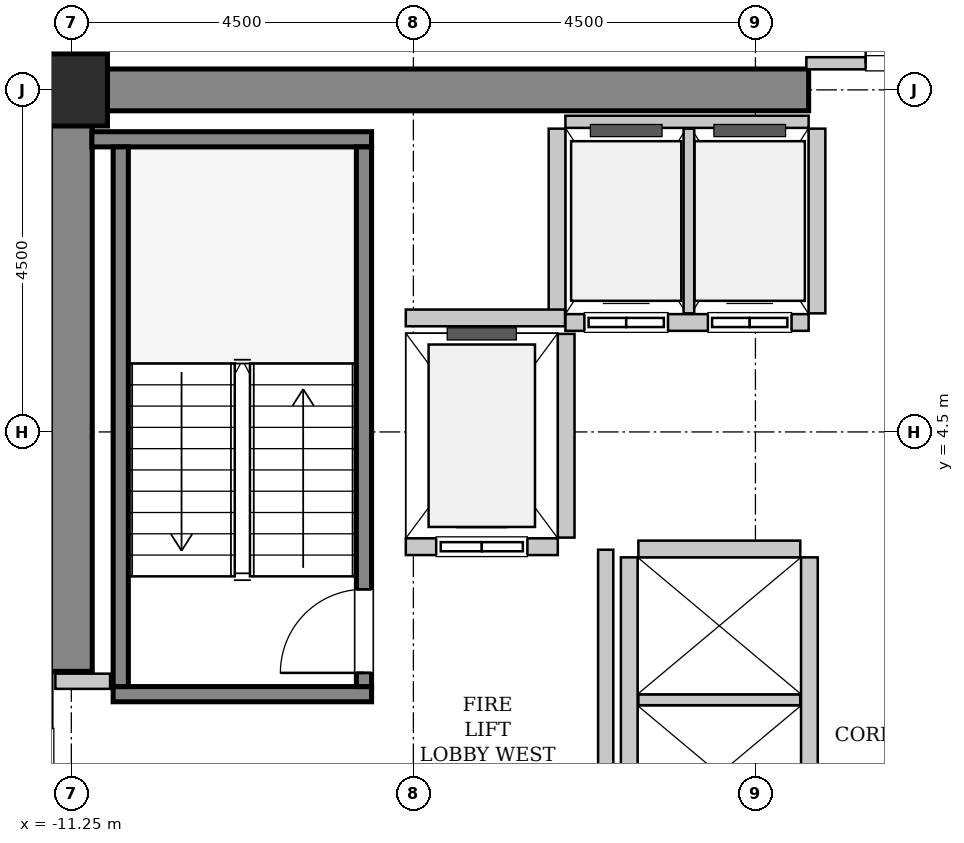
"""IFC4 building model, lengths in metres.
Left out: names, types, materials, properties, quantities, classifications, styles, units other than length and angle.
Written with IfcOpenShell. Run it as: python <this file> out.ifc"""

import sys

from ifc_helpers import new_model, si_unit, direction, frame, frame_2d, origin, origin_2d, place, context, subcontext, project, spatial, rectangle, hollow_rectangle, extrude, source, transform, mapped, element, fill, save


model = new_model("IFC4")
c1 = context("Model", 3, precision=1e-05, world=origin(), true_north=direction((0.0, 1.0)))
c2 = subcontext(c1, "Body", "Model", "MODEL_VIEW")
j1 = project(units=[si_unit("LENGTHUNIT", "METRE"), si_unit("PLANEANGLEUNIT", "RADIAN")], contexts=[c1])
p1 = place(None, origin())
s1 = spatial("IfcSite", under=j1, at=p1, CompositionType="ELEMENT")
p2 = place(p1, origin())
s2 = spatial("IfcBuilding", under=s1, at=p2, CompositionType="ELEMENT")
p3 = place(p2, frame((0.0, 0.0, 121.2)))
s3 = spatial("IfcBuildingStorey", under=s2, at=p3, CompositionType="ELEMENT", Elevation=121.2)
m1 = source(origin(), c2, "Body", "SweptSolid", [
    extrude(rectangle(XDim=9.975, YDim=0.55, at=frame_2d((4.987, 0.0))), origin(), (0.0, 0.0, 1.0), 3.8),
])
p4 = place(p3, frame((-11.525, 9.0, 0.0), z_axis=(0.0, 0.0, 1.0), x_axis=(1.0, 0.0, 0.0)))
e1 = element("IfcWall", 1, at=p4, inside=s3, PredefinedType="SHEAR", context=c2, shape_type="MappedRepresentation", body=[
    mapped(m1, transform((0.0, 0.0, 0.0), x_axis=(1.0, 0.0, 0.0), y_axis=(0.0, 1.0, 0.0), z_axis=(0.0, 0.0, 1.0), scale=1.0)),
])
m2 = source(origin(), c2, "Body", "SweptSolid", [
    extrude(rectangle(XDim=7.375, YDim=0.55, at=frame_2d((3.688, 0.0))), origin(), (0.0, 0.0, 1.0), 3.8),
])
p5 = place(p3, frame((-11.25, 1.35, 0.0), z_axis=(0.0, 0.0, 1.0), x_axis=(0.0, 1.0, 0.0)))
e2 = element("IfcWall", 2, at=p5, inside=s3, PredefinedType="SHEAR", context=c2, shape_type="MappedRepresentation", body=[
    mapped(m2, transform((0.0, 0.0, 0.0), x_axis=(1.0, 0.0, 0.0), y_axis=(0.0, 1.0, 0.0), z_axis=(0.0, 0.0, 1.0), scale=1.0)),
])
m3 = source(origin(), c2, "Body", "SweptSolid", [
    extrude(hollow_rectangle(XDim=0.95, YDim=0.95, WallThickness=0.045, InnerFilletRadius=0.045, OuterFilletRadius=0.09, at=origin_2d()), origin(), (0.0, 0.0, 1.0), 3.8),
])
p6 = place(p3, frame((-11.25, 9.0, 0.0), z_axis=(0.0, 0.0, 1.0), x_axis=(1.0, 0.0, 0.0)))
e3 = element("IfcColumn", 3, at=p6, inside=s3, PredefinedType="COLUMN", context=c2, shape_type="MappedRepresentation", body=[
    mapped(m3, transform((0.0, 0.0, 0.0), x_axis=(1.0, 0.0, 0.0), y_axis=(0.0, 1.0, 0.0), z_axis=(0.0, 0.0, 1.0), scale=1.0)),
])
m4 = source(origin(), c2, "Body", "SweptSolid", [
    extrude(rectangle(XDim=3.4, YDim=0.2, at=frame_2d((1.7, 0.0))), origin(), (0.0, 0.0, 1.0), 3.8),
])
p7 = place(p3, frame((-7.3, 1.05, 0.0), z_axis=(0.0, 0.0, 1.0), x_axis=(-1.0, 0.0, 0.0)))
e4 = element("IfcWall", 4, at=p7, inside=s3, PredefinedType="SOLIDWALL", context=c2, shape_type="MappedRepresentation", body=[
    mapped(m4, transform((0.0, 0.0, 0.0), x_axis=(1.0, 0.0, 0.0), y_axis=(0.0, 1.0, 0.0), z_axis=(0.0, 0.0, 1.0), scale=1.0)),
])
m5 = source(origin(), c2, "Body", "SweptSolid", [
    extrude(rectangle(XDim=3.68, YDim=0.2, at=frame_2d((1.84, 0.0))), origin(), (0.0, 0.0, 1.0), 3.8),
])
p8 = place(p3, frame((-7.3, 8.35, 0.0), z_axis=(0.0, 0.0, 1.0), x_axis=(-1.0, 0.0, 0.0)))
e5 = element("IfcWall", 5, at=p8, inside=s3, PredefinedType="SOLIDWALL", context=c2, shape_type="MappedRepresentation", body=[
    mapped(m5, transform((0.0, 0.0, 0.0), x_axis=(1.0, 0.0, 0.0), y_axis=(0.0, 1.0, 0.0), z_axis=(0.0, 0.0, 1.0), scale=1.0)),
])
m6 = source(origin(), c2, "Body", "SweptSolid", [
    extrude(rectangle(XDim=7.1, YDim=0.2, at=frame_2d((3.55, 0.0))), origin(), (0.0, 0.0, 1.0), 3.8),
])
p9 = place(p3, frame((-7.4, 1.15, 0.0), z_axis=(0.0, 0.0, 1.0), x_axis=(0.0, 1.0, 0.0)))
e6 = element("IfcWall", 6, at=p9, inside=s3, PredefinedType="SOLIDWALL", context=c2, shape_type="MappedRepresentation", body=[
    mapped(m6, transform((0.0, 0.0, 0.0), x_axis=(1.0, 0.0, 0.0), y_axis=(0.0, 1.0, 0.0), z_axis=(0.0, 0.0, 1.0), scale=1.0)),
])
p10 = place(p9, frame((0.18, 0.0, 0.0)))
e7 = element("IfcOpeningElement", 7, at=p10, cuts=e6, PredefinedType="OPENING", context=c2, shape_type="SweptSolid", body=[
    extrude(rectangle(XDim=1.1, YDim=2.15, at=frame_2d((0.55, 1.075))), frame((0.0, 0.11, 0.0), z_axis=(0.0, -1.0, 0.0), x_axis=(1.0, 0.0, 0.0)), (0.0, 0.0, 1.0), 0.22),
])
p11 = place(p3, frame((-10.6, 1.15, 0.0), z_axis=(0.0, 0.0, 1.0), x_axis=(0.0, 1.0, 0.0)))
e8 = element("IfcWall", 8, at=p11, inside=s3, PredefinedType="SOLIDWALL", context=c2, shape_type="MappedRepresentation", body=[
    mapped(m6, transform((0.0, 0.0, 0.0), x_axis=(1.0, 0.0, 0.0), y_axis=(0.0, 1.0, 0.0), z_axis=(0.0, 0.0, 1.0), scale=1.0)),
])
m7 = source(origin(), c2, "Body", "SweptSolid", [
    extrude(rectangle(XDim=2.0, YDim=0.22, at=frame_2d((1.0, 0.0))), origin(), (0.0, 0.0, 1.0), 3.535),
])
p12 = place(p3, frame((-6.85, 2.99, 0.0), z_axis=(0.0, 0.0, 1.0), x_axis=(1.0, 0.0, 0.0)))
e9 = element("IfcWall", 9, at=p12, inside=s3, PredefinedType="SOLIDWALL", context=c2, shape_type="MappedRepresentation", body=[
    mapped(m7, transform((0.0, 0.0, 0.0), x_axis=(1.0, 0.0, 0.0), y_axis=(0.0, 1.0, 0.0), z_axis=(0.0, 0.0, 1.0), scale=1.0)),
])
p13 = place(p12, frame((0.4, 0.0, 0.0)))
e10 = element("IfcOpeningElement", 10, at=p13, cuts=e9, PredefinedType="OPENING", context=c2, shape_type="SweptSolid", body=[
    extrude(rectangle(XDim=1.2, YDim=2.2, at=frame_2d((0.6, 1.1))), frame((0.0, 0.12, 0.0), z_axis=(0.0, -1.0, 0.0), x_axis=(1.0, 0.0, 0.0)), (0.0, 0.0, 1.0), 0.24),
])
m8 = source(origin(), c2, "Body", "SweptSolid", [
    extrude(rectangle(XDim=2.68, YDim=0.22, at=frame_2d((1.34, 0.0))), origin(), (0.0, 0.0, 1.0), 3.535),
])
p14 = place(p3, frame((-4.74, 3.11, 0.0), z_axis=(0.0, 0.0, 1.0), x_axis=(0.0, 1.0, 0.0)))
e11 = element("IfcWall", 11, at=p14, inside=s3, PredefinedType="SOLIDWALL", context=c2, shape_type="MappedRepresentation", body=[
    mapped(m8, transform((0.0, 0.0, 0.0), x_axis=(1.0, 0.0, 0.0), y_axis=(0.0, 1.0, 0.0), z_axis=(0.0, 0.0, 1.0), scale=1.0)),
])
m9 = source(origin(), c2, "Body", "SweptSolid", [
    extrude(rectangle(XDim=3.2, YDim=0.22, at=frame_2d((1.6, 0.0))), origin(), (0.0, 0.0, 1.0), 3.535),
])
p15 = place(p3, frame((-4.75, 5.94, 0.0), z_axis=(0.0, 0.0, 1.0), x_axis=(1.0, 0.0, 0.0)))
e12 = element("IfcWall", 12, at=p15, inside=s3, PredefinedType="SOLIDWALL", context=c2, shape_type="MappedRepresentation", body=[
    mapped(m9, transform((0.0, 0.0, 0.0), x_axis=(1.0, 0.0, 0.0), y_axis=(0.0, 1.0, 0.0), z_axis=(0.0, 0.0, 1.0), scale=1.0)),
])
p16 = place(p15, frame((0.25, 0.0, 0.0)))
e13 = element("IfcOpeningElement", 13, at=p16, cuts=e12, PredefinedType="OPENING", context=c2, shape_type="SweptSolid", body=[
    extrude(rectangle(XDim=1.1, YDim=2.2, at=frame_2d((0.55, 1.1))), frame((0.0, 0.12, 0.0), z_axis=(0.0, -1.0, 0.0), x_axis=(1.0, 0.0, 0.0)), (0.0, 0.0, 1.0), 0.24),
])
p17 = place(p15, frame((1.875, 0.0, 0.0)))
e14 = element("IfcOpeningElement", 14, at=p17, cuts=e12, PredefinedType="OPENING", context=c2, shape_type="SweptSolid", body=[
    extrude(rectangle(XDim=1.1, YDim=2.2, at=frame_2d((0.55, 1.1))), frame((0.0, 0.12, 0.0), z_axis=(0.0, -1.0, 0.0), x_axis=(1.0, 0.0, 0.0)), (0.0, 0.0, 1.0), 0.24),
])
m10 = source(origin(), c2, "Body", "SweptSolid", [
    extrude(rectangle(XDim=3.2, YDim=0.16, at=frame_2d((1.6, 0.0))), origin(), (0.0, 0.0, 1.0), 2.425),
])
p18 = place(p3, frame((-1.55, 8.58, 0.0), z_axis=(0.0, 0.0, 1.0), x_axis=(-1.0, 0.0, 0.0)))
e15 = element("IfcWall", 15, at=p18, inside=s3, PredefinedType="PARTITIONING", context=c2, shape_type="MappedRepresentation", body=[
    mapped(m10, transform((0.0, 0.0, 0.0), x_axis=(1.0, 0.0, 0.0), y_axis=(0.0, 1.0, 0.0), z_axis=(0.0, 0.0, 1.0), scale=1.0)),
])
m11 = source(origin(), c2, "Body", "SweptSolid", [
    extrude(rectangle(XDim=2.43, YDim=0.22, at=frame_2d((1.215, 0.0))), origin(), (0.0, 0.0, 1.0), 3.535),
])
p19 = place(p3, frame((-4.86, 8.49, 0.0), z_axis=(0.0, 0.0, 1.0), x_axis=(0.0, -1.0, 0.0)))
e16 = element("IfcWall", 16, at=p19, inside=s3, PredefinedType="SOLIDWALL", context=c2, shape_type="MappedRepresentation", body=[
    mapped(m11, transform((0.0, 0.0, 0.0), x_axis=(1.0, 0.0, 0.0), y_axis=(0.0, 1.0, 0.0), z_axis=(0.0, 0.0, 1.0), scale=1.0)),
])
m12 = source(origin(), c2, "Body", "SweptSolid", [
    extrude(rectangle(XDim=2.43, YDim=0.14, at=frame_2d((1.215, 0.0))), origin(), (0.0, 0.0, 1.0), 3.535),
])
p20 = place(p3, frame((-3.125, 6.06, 0.0), z_axis=(0.0, 0.0, 1.0), x_axis=(0.0, 1.0, 0.0)))
e17 = element("IfcWall", 17, at=p20, inside=s3, PredefinedType="PARTITIONING", context=c2, shape_type="MappedRepresentation", body=[
    mapped(m12, transform((0.0, 0.0, 0.0), x_axis=(1.0, 0.0, 0.0), y_axis=(0.0, 1.0, 0.0), z_axis=(0.0, 0.0, 1.0), scale=1.0)),
])
p21 = place(p3, frame((-1.44, 6.06, 0.0), z_axis=(0.0, 0.0, 1.0), x_axis=(0.0, 1.0, 0.0)))
e18 = element("IfcWall", 18, at=p21, inside=s3, PredefinedType="SOLIDWALL", context=c2, shape_type="MappedRepresentation", body=[
    mapped(m11, transform((0.0, 0.0, 0.0), x_axis=(1.0, 0.0, 0.0), y_axis=(0.0, 1.0, 0.0), z_axis=(0.0, 0.0, 1.0), scale=1.0)),
])
m13 = source(origin(), c2, "Body", "SweptSolid", [
    extrude(rectangle(XDim=5.7, YDim=0.22, at=frame_2d((2.85, 0.0))), origin(), (0.0, 0.0, 1.0), 3.535),
])
for number, where, z_axis, x_axis in (
    (19, (-1.54, -2.85, 0.0), (0.0, 0.0, 1.0), (0.0, 1.0, 0.0)),
    (20, (-3.91, 2.85, 0.0), (0.0, 0.0, 1.0), (0.0, -1.0, 0.0)),
):
    element("IfcWall", number, at=place(p3, frame(where, z_axis=z_axis, x_axis=x_axis)), inside=s3, PredefinedType="SOLIDWALL", context=c2, shape_type="MappedRepresentation", body=[
        mapped(m13, transform((0.0, 0.0, 0.0), x_axis=(1.0, 0.0, 0.0), y_axis=(0.0, 1.0, 0.0), z_axis=(0.0, 0.0, 1.0), scale=1.0)),
    ])
m14 = source(origin(), c2, "Body", "SweptSolid", [
    extrude(rectangle(XDim=2.13, YDim=0.14, at=frame_2d((1.065, 0.0))), origin(), (0.0, 0.0, 1.0), 3.535),
])
p22 = place(p3, frame((-3.79, 0.975, 0.0), z_axis=(0.0, 0.0, 1.0), x_axis=(1.0, 0.0, 0.0)))
e21 = element("IfcWall", 21, at=p22, inside=s3, PredefinedType="PARTITIONING", context=c2, shape_type="MappedRepresentation", body=[
    mapped(m14, transform((0.0, 0.0, 0.0), x_axis=(1.0, 0.0, 0.0), y_axis=(0.0, 1.0, 0.0), z_axis=(0.0, 0.0, 1.0), scale=1.0)),
])
m15 = source(origin(), c2, "Body", "SweptSolid", [
    extrude(rectangle(XDim=2.13, YDim=0.22, at=frame_2d((1.065, 0.0))), origin(), (0.0, 0.0, 1.0), 3.535),
])
p23 = place(p3, frame((-1.66, 2.96, 0.0), z_axis=(0.0, 0.0, 1.0), x_axis=(-1.0, 0.0, 0.0)))
e22 = element("IfcWall", 22, at=p23, inside=s3, PredefinedType="SOLIDWALL", context=c2, shape_type="MappedRepresentation", body=[
    mapped(m15, transform((0.0, 0.0, 0.0), x_axis=(1.0, 0.0, 0.0), y_axis=(0.0, 1.0, 0.0), z_axis=(0.0, 0.0, 1.0), scale=1.0)),
])
m16 = source(origin(), c2, "Body", "SweptSolid", [
    extrude(rectangle(XDim=2.095, YDim=0.22, at=frame_2d((1.048, 0.0))), origin(), (0.0, 0.0, 1.0), 3.535),
])
p24 = place(p3, frame((-6.85, 6.0, 0.0), z_axis=(0.0, 0.0, 1.0), x_axis=(1.0, 0.0, 0.0)))
e23 = element("IfcWall", 23, at=p24, inside=s3, PredefinedType="SOLIDWALL", context=c2, shape_type="MappedRepresentation", body=[
    mapped(m16, transform((0.0, 0.0, 0.0), x_axis=(1.0, 0.0, 0.0), y_axis=(0.0, 1.0, 0.0), z_axis=(0.0, 0.0, 1.0), scale=1.0)),
])
m17 = source(origin(), c2, "Body", "SweptSolid", [
    extrude(rectangle(XDim=5.9, YDim=0.2, at=frame_2d((2.95, 0.0))), origin(), (0.0, 0.0, 1.0), 3.535),
])
p25 = place(p3, frame((-4.22, -2.95, 0.0), z_axis=(0.0, 0.0, 1.0), x_axis=(0.0, 1.0, 0.0)))
e24 = element("IfcWall", 24, at=p25, inside=s3, PredefinedType="PARTITIONING", context=c2, shape_type="MappedRepresentation", body=[
    mapped(m17, transform((0.0, 0.0, 0.0), x_axis=(1.0, 0.0, 0.0), y_axis=(0.0, 1.0, 0.0), z_axis=(0.0, 0.0, 1.0), scale=1.0)),
])
m18 = source(origin(), c2, "Body", "SweptSolid", [
    extrude(rectangle(XDim=0.72, YDim=0.2, at=frame_2d((0.36, 0.0))), origin(), (0.0, 0.0, 1.0), 3.535),
])
p26 = place(p3, frame((-11.46, 1.22, 0.0), z_axis=(0.0, 0.0, 1.0), x_axis=(1.0, 0.0, 0.0)))
e25 = element("IfcWall", 25, at=p26, inside=s3, PredefinedType="PARTITIONING", context=c2, shape_type="MappedRepresentation", body=[
    mapped(m18, transform((0.0, 0.0, 0.0), x_axis=(1.0, 0.0, 0.0), y_axis=(0.0, 1.0, 0.0), z_axis=(0.0, 0.0, 1.0), scale=1.0)),
])
m19 = source(origin(), c2, "Body", "SweptSolid", [
    extrude(rectangle(XDim=3.16, YDim=0.16, at=frame_2d((1.58, 0.0))), origin(), (0.0, 0.0, 1.0), 2.425),
])
p27 = place(p3, frame((-1.58, 9.35, 0.0), z_axis=(0.0, 0.0, 1.0), x_axis=(1.0, 0.0, 0.0)))
e26 = element("IfcWall", 26, at=p27, inside=s3, PredefinedType="PARTITIONING", context=c2, shape_type="MappedRepresentation", body=[
    mapped(m19, transform((0.0, 0.0, 0.0), x_axis=(1.0, 0.0, 0.0), y_axis=(0.0, 1.0, 0.0), z_axis=(0.0, 0.0, 1.0), scale=1.0)),
])
p28 = place(p27, frame((0.78, 0.0, 0.0)))
e27 = element("IfcOpeningElement", 27, at=p28, cuts=e26, PredefinedType="OPENING", context=c2, shape_type="SweptSolid", body=[
    extrude(rectangle(XDim=1.6, YDim=2.3, at=frame_2d((0.8, 1.15))), frame((0.0, 0.09, 0.0), z_axis=(0.0, -1.0, 0.0), x_axis=(1.0, 0.0, 0.0)), (0.0, 0.0, 1.0), 0.18),
])
m20 = source(origin(), c2, "Body", "SweptSolid", [
    extrude(rectangle(XDim=1.1, YDim=2.15, at=frame_2d((0.55, 1.075))), frame((0.0, 0.025, 0.0), z_axis=(0.0, -1.0, 0.0), x_axis=(1.0, 0.0, 0.0)), (0.0, 0.0, 1.0), 0.05),
])
p29 = place(p10, origin())
e28 = element("IfcDoor", 28, at=p29, inside=s3, OperationType="SINGLE_SWING_LEFT", PredefinedType="DOOR", context=c2, shape_type="MappedRepresentation", body=[
    mapped(m20, transform((0.0, 0.0, 0.0), x_axis=(1.0, 0.0, 0.0), y_axis=(0.0, 1.0, 0.0), z_axis=(0.0, 0.0, 1.0), scale=1.0)),
])
fill(e7, e28)
m21 = source(origin(), c2, "Body", "SweptSolid", [
    extrude(rectangle(XDim=1.2, YDim=2.2, at=frame_2d((0.6, 1.1))), frame((0.0, 0.025, 0.0), z_axis=(0.0, -1.0, 0.0), x_axis=(1.0, 0.0, 0.0)), (0.0, 0.0, 1.0), 0.05),
])
p30 = place(p13, origin())
e29 = element("IfcDoor", 29, at=p30, inside=s3, OperationType="SLIDING_TO_LEFT", PredefinedType="DOOR", context=c2, shape_type="MappedRepresentation", body=[
    mapped(m21, transform((0.0, 0.0, 0.0), x_axis=(1.0, 0.0, 0.0), y_axis=(0.0, 1.0, 0.0), z_axis=(0.0, 0.0, 1.0), scale=1.0)),
])
fill(e10, e29)
m22 = source(origin(), c2, "Body", "SweptSolid", [
    extrude(rectangle(XDim=1.1, YDim=2.2, at=frame_2d((0.55, 1.1))), frame((0.0, 0.025, 0.0), z_axis=(0.0, -1.0, 0.0), x_axis=(1.0, 0.0, 0.0)), (0.0, 0.0, 1.0), 0.05),
])
p31 = place(p16, origin())
e30 = element("IfcDoor", 30, at=p31, inside=s3, OperationType="DOUBLE_DOOR_SLIDING", PredefinedType="DOOR", context=c2, shape_type="MappedRepresentation", body=[
    mapped(m22, transform((0.0, 0.0, 0.0), x_axis=(1.0, 0.0, 0.0), y_axis=(0.0, 1.0, 0.0), z_axis=(0.0, 0.0, 1.0), scale=1.0)),
])
fill(e13, e30)
p32 = place(p17, origin())
e31 = element("IfcDoor", 31, at=p32, inside=s3, OperationType="DOUBLE_DOOR_SLIDING", PredefinedType="DOOR", context=c2, shape_type="MappedRepresentation", body=[
    mapped(m22, transform((0.0, 0.0, 0.0), x_axis=(1.0, 0.0, 0.0), y_axis=(0.0, 1.0, 0.0), z_axis=(0.0, 0.0, 1.0), scale=1.0)),
])
fill(e14, e31)
m23 = source(origin(), c2, "Body", "SweptSolid", [
    extrude(rectangle(XDim=1.6, YDim=2.3, at=frame_2d((0.8, 1.15))), frame((0.0, 0.025, 0.0), z_axis=(0.0, -1.0, 0.0), x_axis=(1.0, 0.0, 0.0)), (0.0, 0.0, 1.0), 0.05),
])
p33 = place(p28, origin())
e32 = element("IfcDoor", 32, at=p33, inside=s3, OperationType="DOUBLE_DOOR_SINGLE_SWING", PredefinedType="DOOR", context=c2, shape_type="MappedRepresentation", body=[
    mapped(m23, transform((0.0, 0.0, 0.0), x_axis=(1.0, 0.0, 0.0), y_axis=(0.0, 1.0, 0.0), z_axis=(0.0, 0.0, 1.0), scale=1.0)),
])
fill(e27, e32)
save(model, sys.argv[1])
